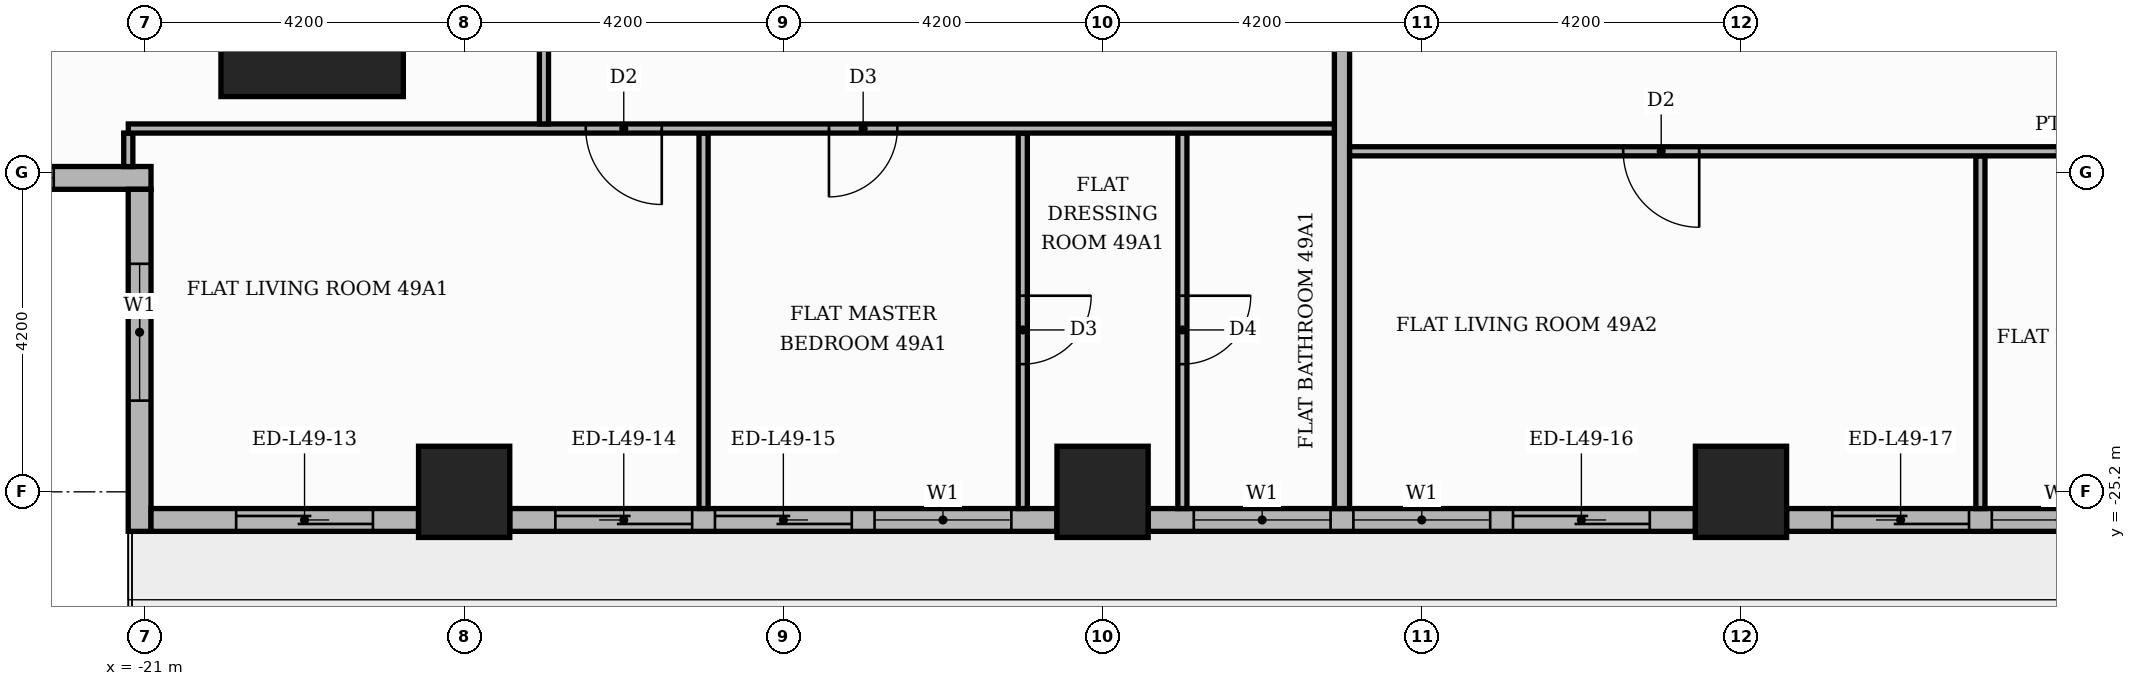
"""IFC4 building model, lengths in metres.
Left out: names, types, materials, properties, quantities, classifications, styles, units other than length and angle.
Written with IfcOpenShell. Run it as: python <this file> out.ifc"""

import sys

from ifc_helpers import new_model, si_unit, direction, frame, frame_2d, origin, origin_2d, place, context, subcontext, project, spatial, rectangle, extrude, element, fill, save


model = new_model("IFC4")
c1 = context("Model", 3, precision=1e-05, world=origin(), true_north=direction((0.0, 1.0)))
c2 = subcontext(c1, "Body", "Model", "MODEL_VIEW")
j1 = project(units=[si_unit("LENGTHUNIT", "METRE"), si_unit("PLANEANGLEUNIT", "RADIAN")], contexts=[c1])
p1 = place(None, origin())
s1 = spatial("IfcSite", under=j1, at=p1, CompositionType="ELEMENT")
p2 = place(p1, origin())
s2 = spatial("IfcBuilding", under=s1, at=p2, CompositionType="ELEMENT")
p3 = place(p2, frame((0.0, 0.0, 207.9)))
s3 = spatial("IfcBuildingStorey", under=s2, at=p3, CompositionType="ELEMENT", Elevation=207.9)
p4 = place(p3, frame((-18.8, -18.8, 0.0), z_axis=(0.0, 0.0, 1.0), x_axis=(1.0, 0.0, 0.0)))
e1 = element("IfcColumn", 1, at=p4, inside=s3, PredefinedType="COLUMN", context=c2, shape_type="SweptSolid", body=[
    extrude(rectangle(XDim=2.4, YDim=2.4, at=origin_2d()), origin(), (0.0, 0.0, 1.0), 3.9),
])
for number, where, z_axis, x_axis in (
    (2, (0.0, -25.2, 0.0), (0.0, 0.0, 1.0), (1.0, 0.0, 0.0)),
    (3, (-8.4, -25.2, 0.0), (0.0, 0.0, 1.0), (1.0, 0.0, 0.0)),
    (4, (-16.8, -25.2, 0.0), (0.0, 0.0, 1.0), (1.0, 0.0, 0.0)),
):
    element("IfcColumn", number, at=place(p3, frame(where, z_axis=z_axis, x_axis=x_axis)), inside=s3, PredefinedType="COLUMN", context=c2, shape_type="SweptSolid", body=[
        extrude(rectangle(XDim=1.2, YDim=1.2, at=origin_2d()), origin(), (0.0, 0.0, 1.0), 3.9),
    ])
p5 = place(p3, frame((-25.42, -21.07, 0.0), z_axis=(0.0, 0.0, 1.0), x_axis=(1.0, 0.0, 0.0)))
e5 = element("IfcWall", 5, at=p5, inside=s3, PredefinedType="STANDARD", context=c2, shape_type="SweptSolid", body=[
    extrude(rectangle(XDim=4.5, YDim=0.3, at=frame_2d((2.25, 0.0))), origin(), (0.0, 0.0, 1.0), 3.48),
])
p6 = place(p5, frame((1.42, 0.0, 0.9)))
e6 = element("IfcOpeningElement", 6, at=p6, cuts=e5, PredefinedType="OPENING", context=c2, shape_type="SweptSolid", body=[
    extrude(rectangle(XDim=1.8, YDim=2.1, at=frame_2d((0.9, 1.05))), frame((0.0, 0.16, 0.0), z_axis=(0.0, -1.0, 0.0), x_axis=(1.0, 0.0, 0.0)), (0.0, 0.0, 1.0), 0.32),
])
p7 = place(p3, frame((-21.07, -21.22, 0.0), z_axis=(0.0, 0.0, 1.0), x_axis=(0.0, -1.0, 0.0)))
e7 = element("IfcWall", 7, at=p7, inside=s3, PredefinedType="STANDARD", context=c2, shape_type="SweptSolid", body=[
    extrude(rectangle(XDim=4.5, YDim=0.3, at=frame_2d((2.25, 0.0))), origin(), (0.0, 0.0, 1.0), 3.48),
])
p8 = place(p7, frame((0.98, 0.0, 0.9)))
e8 = element("IfcOpeningElement", 8, at=p8, cuts=e7, PredefinedType="OPENING", context=c2, shape_type="SweptSolid", body=[
    extrude(rectangle(XDim=1.8, YDim=2.1, at=frame_2d((0.9, 1.05))), frame((0.0, 0.16, 0.0), z_axis=(0.0, -1.0, 0.0), x_axis=(1.0, 0.0, 0.0)), (0.0, 0.0, 1.0), 0.32),
])
p9 = place(p3, frame((-20.92, -25.57, 0.0), z_axis=(0.0, 0.0, 1.0), x_axis=(1.0, 0.0, 0.0)))
e9 = element("IfcWall", 9, at=p9, inside=s3, PredefinedType="STANDARD", context=c2, shape_type="SweptSolid", body=[
    extrude(rectangle(XDim=3.52, YDim=0.3, at=frame_2d((1.76, 0.0))), origin(), (0.0, 0.0, 1.0), 3.48),
])
p10 = place(p9, frame((1.12, 0.0, 0.0)))
e10 = element("IfcOpeningElement", 10, at=p10, cuts=e9, PredefinedType="OPENING", context=c2, shape_type="SweptSolid", body=[
    extrude(rectangle(XDim=1.8, YDim=2.4, at=frame_2d((0.9, 1.2))), frame((0.0, 0.16, 0.0), z_axis=(0.0, -1.0, 0.0), x_axis=(1.0, 0.0, 0.0)), (0.0, 0.0, 1.0), 0.32),
])
p11 = place(p3, frame((-16.2, -25.57, 0.0), z_axis=(0.0, 0.0, 1.0), x_axis=(1.0, 0.0, 0.0)))
e11 = element("IfcWall", 11, at=p11, inside=s3, PredefinedType="STANDARD", context=c2, shape_type="SweptSolid", body=[
    extrude(rectangle(XDim=7.2, YDim=0.3, at=frame_2d((3.6, 0.0))), origin(), (0.0, 0.0, 1.0), 3.48),
])
p12 = place(p11, frame((0.6, 0.0, 0.0)))
e12 = element("IfcOpeningElement", 12, at=p12, cuts=e11, PredefinedType="OPENING", context=c2, shape_type="SweptSolid", body=[
    extrude(rectangle(XDim=1.8, YDim=2.4, at=frame_2d((0.9, 1.2))), frame((0.0, 0.16, 0.0), z_axis=(0.0, -1.0, 0.0), x_axis=(1.0, 0.0, 0.0)), (0.0, 0.0, 1.0), 0.32),
])
p13 = place(p11, frame((2.7, 0.0, 0.0)))
e13 = element("IfcOpeningElement", 13, at=p13, cuts=e11, PredefinedType="OPENING", context=c2, shape_type="SweptSolid", body=[
    extrude(rectangle(XDim=1.8, YDim=2.4, at=frame_2d((0.9, 1.2))), frame((0.0, 0.16, 0.0), z_axis=(0.0, -1.0, 0.0), x_axis=(1.0, 0.0, 0.0)), (0.0, 0.0, 1.0), 0.32),
])
p14 = place(p11, frame((4.8, 0.0, 0.9)))
e14 = element("IfcOpeningElement", 14, at=p14, cuts=e11, PredefinedType="OPENING", context=c2, shape_type="SweptSolid", body=[
    extrude(rectangle(XDim=1.8, YDim=2.1, at=frame_2d((0.9, 1.05))), frame((0.0, 0.16, 0.0), z_axis=(0.0, -1.0, 0.0), x_axis=(1.0, 0.0, 0.0)), (0.0, 0.0, 1.0), 0.32),
])
p15 = place(p3, frame((-7.8, -25.57, 0.0), z_axis=(0.0, 0.0, 1.0), x_axis=(1.0, 0.0, 0.0)))
e15 = element("IfcWall", 15, at=p15, inside=s3, PredefinedType="STANDARD", context=c2, shape_type="SweptSolid", body=[
    extrude(rectangle(XDim=7.2, YDim=0.3, at=frame_2d((3.6, 0.0))), origin(), (0.0, 0.0, 1.0), 3.48),
])
p16 = place(p15, frame((0.6, 0.0, 0.9)))
e16 = element("IfcOpeningElement", 16, at=p16, cuts=e15, PredefinedType="OPENING", context=c2, shape_type="SweptSolid", body=[
    extrude(rectangle(XDim=1.8, YDim=2.1, at=frame_2d((0.9, 1.05))), frame((0.0, 0.16, 0.0), z_axis=(0.0, -1.0, 0.0), x_axis=(1.0, 0.0, 0.0)), (0.0, 0.0, 1.0), 0.32),
])
p17 = place(p15, frame((2.7, 0.0, 0.9)))
e17 = element("IfcOpeningElement", 17, at=p17, cuts=e15, PredefinedType="OPENING", context=c2, shape_type="SweptSolid", body=[
    extrude(rectangle(XDim=1.8, YDim=2.1, at=frame_2d((0.9, 1.05))), frame((0.0, 0.16, 0.0), z_axis=(0.0, -1.0, 0.0), x_axis=(1.0, 0.0, 0.0)), (0.0, 0.0, 1.0), 0.32),
])
p18 = place(p15, frame((4.8, 0.0, 0.0)))
e18 = element("IfcOpeningElement", 18, at=p18, cuts=e15, PredefinedType="OPENING", context=c2, shape_type="SweptSolid", body=[
    extrude(rectangle(XDim=1.8, YDim=2.4, at=frame_2d((0.9, 1.2))), frame((0.0, 0.16, 0.0), z_axis=(0.0, -1.0, 0.0), x_axis=(1.0, 0.0, 0.0)), (0.0, 0.0, 1.0), 0.32),
])
p19 = place(p3, frame((0.6, -25.57, 0.0), z_axis=(0.0, 0.0, 1.0), x_axis=(1.0, 0.0, 0.0)))
e19 = element("IfcWall", 19, at=p19, inside=s3, PredefinedType="STANDARD", context=c2, shape_type="SweptSolid", body=[
    extrude(rectangle(XDim=7.2, YDim=0.3, at=frame_2d((3.6, 0.0))), origin(), (0.0, 0.0, 1.0), 3.48),
])
p20 = place(p19, frame((0.6, 0.0, 0.0)))
e20 = element("IfcOpeningElement", 20, at=p20, cuts=e19, PredefinedType="OPENING", context=c2, shape_type="SweptSolid", body=[
    extrude(rectangle(XDim=1.8, YDim=2.4, at=frame_2d((0.9, 1.2))), frame((0.0, 0.16, 0.0), z_axis=(0.0, -1.0, 0.0), x_axis=(1.0, 0.0, 0.0)), (0.0, 0.0, 1.0), 0.32),
])
p21 = place(p19, frame((2.7, 0.0, 0.9)))
e21 = element("IfcOpeningElement", 21, at=p21, cuts=e19, PredefinedType="OPENING", context=c2, shape_type="SweptSolid", body=[
    extrude(rectangle(XDim=1.8, YDim=2.1, at=frame_2d((0.9, 1.05))), frame((0.0, 0.16, 0.0), z_axis=(0.0, -1.0, 0.0), x_axis=(1.0, 0.0, 0.0)), (0.0, 0.0, 1.0), 0.32),
])
p22 = place(p19, frame((4.8, 0.0, 0.0)))
e22 = element("IfcOpeningElement", 22, at=p22, cuts=e19, PredefinedType="OPENING", context=c2, shape_type="SweptSolid", body=[
    extrude(rectangle(XDim=1.8, YDim=2.4, at=frame_2d((0.9, 1.2))), frame((0.0, 0.16, 0.0), z_axis=(0.0, -1.0, 0.0), x_axis=(1.0, 0.0, 0.0)), (0.0, 0.0, 1.0), 0.32),
])
p23 = place(p3, frame((-13.65, -25.42, 0.0), z_axis=(0.0, 0.0, 1.0), x_axis=(0.0, 1.0, 0.0)))
e23 = element("IfcWall", 23, at=p23, inside=s3, PredefinedType="PARTITIONING", context=c2, shape_type="SweptSolid", body=[
    extrude(rectangle(XDim=4.94, YDim=0.12, at=frame_2d((2.47, 0.0))), origin(), (0.0, 0.0, 1.0), 3.48),
])
p24 = place(p3, frame((-9.45, -25.42, 0.0), z_axis=(0.0, 0.0, 1.0), x_axis=(0.0, 1.0, 0.0)))
e24 = element("IfcWall", 24, at=p24, inside=s3, PredefinedType="PARTITIONING", context=c2, shape_type="SweptSolid", body=[
    extrude(rectangle(XDim=4.94, YDim=0.12, at=frame_2d((2.47, 0.0))), origin(), (0.0, 0.0, 1.0), 3.48),
])
p25 = place(p24, frame((1.9, 0.0, 0.0)))
e25 = element("IfcOpeningElement", 25, at=p25, cuts=e24, PredefinedType="OPENING", context=c2, shape_type="SweptSolid", body=[
    extrude(rectangle(XDim=0.9, YDim=2.1, at=frame_2d((0.45, 1.05))), frame((0.0, 0.07, 0.0), z_axis=(0.0, -1.0, 0.0), x_axis=(1.0, 0.0, 0.0)), (0.0, 0.0, 1.0), 0.14),
])
p26 = place(p3, frame((-7.35, -25.42, 0.0), z_axis=(0.0, 0.0, 1.0), x_axis=(0.0, 1.0, 0.0)))
e26 = element("IfcWall", 26, at=p26, inside=s3, PredefinedType="PARTITIONING", context=c2, shape_type="SweptSolid", body=[
    extrude(rectangle(XDim=4.94, YDim=0.12, at=frame_2d((2.47, 0.0))), origin(), (0.0, 0.0, 1.0), 3.48),
])
p27 = place(p26, frame((1.9, 0.0, 0.0)))
e27 = element("IfcOpeningElement", 27, at=p27, cuts=e26, PredefinedType="OPENING", context=c2, shape_type="SweptSolid", body=[
    extrude(rectangle(XDim=0.9, YDim=2.1, at=frame_2d((0.45, 1.05))), frame((0.0, 0.07, 0.0), z_axis=(0.0, -1.0, 0.0), x_axis=(1.0, 0.0, 0.0)), (0.0, 0.0, 1.0), 0.14),
])
p28 = place(p3, frame((-5.25, -25.42, 0.0), z_axis=(0.0, 0.0, 1.0), x_axis=(0.0, 1.0, 0.0)))
e28 = element("IfcWall", 28, at=p28, inside=s3, PredefinedType="PARTITIONING", context=c2, shape_type="SweptSolid", body=[
    extrude(rectangle(XDim=11.67, YDim=0.2, at=frame_2d((5.835, 0.0))), origin(), (0.0, 0.0, 1.0), 3.48),
])
p29 = place(p3, frame((3.15, -25.42, 0.0), z_axis=(0.0, 0.0, 1.0), x_axis=(0.0, 1.0, 0.0)))
e29 = element("IfcWall", 29, at=p29, inside=s3, PredefinedType="PARTITIONING", context=c2, shape_type="SweptSolid", body=[
    extrude(rectangle(XDim=4.64, YDim=0.12, at=frame_2d((2.32, 0.0))), origin(), (0.0, 0.0, 1.0), 3.48),
])
p30 = place(p3, frame((-21.219, -20.921, 0.0), z_axis=(0.0, 0.0, 1.0), x_axis=(0.0, 1.0, 0.0)))
e30 = element("IfcWall", 30, at=p30, inside=s3, PredefinedType="PARTITIONING", context=c2, shape_type="SweptSolid", body=[
    extrude(rectangle(XDim=0.441, YDim=0.12, at=frame_2d((0.22, 0.0))), origin(), (0.0, 0.0, 1.0), 3.48),
])
p31 = place(p3, frame((-5.15, -20.72, 0.0), z_axis=(0.0, 0.0, 1.0), x_axis=(1.0, 0.0, 0.0)))
e31 = element("IfcWall", 31, at=p31, inside=s3, PredefinedType="PARTITIONING", context=c2, shape_type="SweptSolid", body=[
    extrude(rectangle(XDim=18.7, YDim=0.12, at=frame_2d((9.35, 0.0))), origin(), (0.0, 0.0, 1.0), 3.48),
])
p32 = place(p31, frame((3.6, 0.0, 0.0)))
e32 = element("IfcOpeningElement", 32, at=p32, cuts=e31, PredefinedType="OPENING", context=c2, shape_type="SweptSolid", body=[
    extrude(rectangle(XDim=1.0, YDim=2.1, at=frame_2d((0.5, 1.05))), frame((0.0, 0.07, 0.0), z_axis=(0.0, -1.0, 0.0), x_axis=(1.0, 0.0, 0.0)), (0.0, 0.0, 1.0), 0.14),
])
p33 = place(p31, frame((11.0, 0.0, 0.0)))
e33 = element("IfcOpeningElement", 33, at=p33, cuts=e31, PredefinedType="OPENING", context=c2, shape_type="SweptSolid", body=[
    extrude(rectangle(XDim=0.9, YDim=2.1, at=frame_2d((0.45, 1.05))), frame((0.0, 0.07, 0.0), z_axis=(0.0, -1.0, 0.0), x_axis=(1.0, 0.0, 0.0)), (0.0, 0.0, 1.0), 0.14),
])
p34 = place(p3, frame((-21.219, -20.42, 0.0), z_axis=(0.0, 0.0, 1.0), x_axis=(1.0, 0.0, 0.0)))
e34 = element("IfcWall", 34, at=p34, inside=s3, PredefinedType="PARTITIONING", context=c2, shape_type="SweptSolid", body=[
    extrude(rectangle(XDim=15.869, YDim=0.12, at=frame_2d((7.935, 0.0))), origin(), (0.0, 0.0, 1.0), 3.48),
])
p35 = place(p34, frame((6.019, 0.0, 0.0)))
e35 = element("IfcOpeningElement", 35, at=p35, cuts=e34, PredefinedType="OPENING", context=c2, shape_type="SweptSolid", body=[
    extrude(rectangle(XDim=1.0, YDim=2.1, at=frame_2d((0.5, 1.05))), frame((0.0, 0.07, 0.0), z_axis=(0.0, -1.0, 0.0), x_axis=(1.0, 0.0, 0.0)), (0.0, 0.0, 1.0), 0.14),
])
p36 = place(p34, frame((9.219, 0.0, 0.0)))
e36 = element("IfcOpeningElement", 36, at=p36, cuts=e34, PredefinedType="OPENING", context=c2, shape_type="SweptSolid", body=[
    extrude(rectangle(XDim=0.9, YDim=2.1, at=frame_2d((0.45, 1.05))), frame((0.0, 0.07, 0.0), z_axis=(0.0, -1.0, 0.0), x_axis=(1.0, 0.0, 0.0)), (0.0, 0.0, 1.0), 0.14),
])
p37 = place(p3, frame((-15.75, -20.36, 0.0), z_axis=(0.0, 0.0, 1.0), x_axis=(0.0, 1.0, 0.0)))
e37 = element("IfcWall", 37, at=p37, inside=s3, PredefinedType="PARTITIONING", context=c2, shape_type="SweptSolid", body=[
    extrude(rectangle(XDim=6.61, YDim=0.12, at=frame_2d((3.305, 0.0))), origin(), (0.0, 0.0, 1.0), 3.48),
])
p38 = place(p37, frame((2.825, 0.0, 0.0)))
e38 = element("IfcOpeningElement", 38, at=p38, cuts=e37, PredefinedType="OPENING", context=c2, shape_type="SweptSolid", body=[
    extrude(rectangle(XDim=1.0, YDim=2.1, at=frame_2d((0.5, 1.05))), frame((0.0, 0.07, 0.0), z_axis=(0.0, -1.0, 0.0), x_axis=(1.0, 0.0, 0.0)), (0.0, 0.0, 1.0), 0.14),
])
p39 = place(p6, origin())
e39 = element("IfcWindow", 39, at=p39, inside=s3, PartitioningType="SINGLE_PANEL", PredefinedType="WINDOW", context=c2, shape_type="SweptSolid", body=[
    extrude(rectangle(XDim=1.8, YDim=2.1, at=frame_2d((0.9, 1.05))), frame((0.0, 0.03, 0.0), z_axis=(0.0, -1.0, 0.0), x_axis=(1.0, 0.0, 0.0)), (0.0, 0.0, 1.0), 0.06),
])
fill(e6, e39)
p40 = place(p8, origin())
e40 = element("IfcWindow", 40, at=p40, inside=s3, PartitioningType="SINGLE_PANEL", PredefinedType="WINDOW", context=c2, shape_type="SweptSolid", body=[
    extrude(rectangle(XDim=1.8, YDim=2.1, at=frame_2d((0.9, 1.05))), frame((0.0, 0.03, 0.0), z_axis=(0.0, -1.0, 0.0), x_axis=(1.0, 0.0, 0.0)), (0.0, 0.0, 1.0), 0.06),
])
fill(e8, e40)
p41 = place(p10, origin())
e41 = element("IfcDoor", 41, at=p41, inside=s3, OperationType="SLIDING_TO_RIGHT", PredefinedType="DOOR", context=c2, shape_type="SweptSolid", body=[
    extrude(rectangle(XDim=1.8, YDim=2.4, at=frame_2d((0.9, 1.2))), frame((0.0, 0.025, 0.0), z_axis=(0.0, -1.0, 0.0), x_axis=(1.0, 0.0, 0.0)), (0.0, 0.0, 1.0), 0.05),
])
fill(e10, e41)
p42 = place(p12, origin())
e42 = element("IfcDoor", 42, at=p42, inside=s3, OperationType="SLIDING_TO_LEFT", PredefinedType="DOOR", context=c2, shape_type="SweptSolid", body=[
    extrude(rectangle(XDim=1.8, YDim=2.4, at=frame_2d((0.9, 1.2))), frame((0.0, 0.025, 0.0), z_axis=(0.0, -1.0, 0.0), x_axis=(1.0, 0.0, 0.0)), (0.0, 0.0, 1.0), 0.05),
])
fill(e12, e42)
p43 = place(p13, origin())
e43 = element("IfcDoor", 43, at=p43, inside=s3, OperationType="SLIDING_TO_RIGHT", PredefinedType="DOOR", context=c2, shape_type="SweptSolid", body=[
    extrude(rectangle(XDim=1.8, YDim=2.4, at=frame_2d((0.9, 1.2))), frame((0.0, 0.025, 0.0), z_axis=(0.0, -1.0, 0.0), x_axis=(1.0, 0.0, 0.0)), (0.0, 0.0, 1.0), 0.05),
])
fill(e13, e43)
p44 = place(p14, origin())
e44 = element("IfcWindow", 44, at=p44, inside=s3, PartitioningType="SINGLE_PANEL", PredefinedType="WINDOW", context=c2, shape_type="SweptSolid", body=[
    extrude(rectangle(XDim=1.8, YDim=2.1, at=frame_2d((0.9, 1.05))), frame((0.0, 0.03, 0.0), z_axis=(0.0, -1.0, 0.0), x_axis=(1.0, 0.0, 0.0)), (0.0, 0.0, 1.0), 0.06),
])
fill(e14, e44)
p45 = place(p16, origin())
e45 = element("IfcWindow", 45, at=p45, inside=s3, PartitioningType="SINGLE_PANEL", PredefinedType="WINDOW", context=c2, shape_type="SweptSolid", body=[
    extrude(rectangle(XDim=1.8, YDim=2.1, at=frame_2d((0.9, 1.05))), frame((0.0, 0.03, 0.0), z_axis=(0.0, -1.0, 0.0), x_axis=(1.0, 0.0, 0.0)), (0.0, 0.0, 1.0), 0.06),
])
fill(e16, e45)
p46 = place(p17, origin())
e46 = element("IfcWindow", 46, at=p46, inside=s3, PartitioningType="SINGLE_PANEL", PredefinedType="WINDOW", context=c2, shape_type="SweptSolid", body=[
    extrude(rectangle(XDim=1.8, YDim=2.1, at=frame_2d((0.9, 1.05))), frame((0.0, 0.03, 0.0), z_axis=(0.0, -1.0, 0.0), x_axis=(1.0, 0.0, 0.0)), (0.0, 0.0, 1.0), 0.06),
])
fill(e17, e46)
p47 = place(p18, origin())
e47 = element("IfcDoor", 47, at=p47, inside=s3, OperationType="SLIDING_TO_RIGHT", PredefinedType="DOOR", context=c2, shape_type="SweptSolid", body=[
    extrude(rectangle(XDim=1.8, YDim=2.4, at=frame_2d((0.9, 1.2))), frame((0.0, 0.025, 0.0), z_axis=(0.0, -1.0, 0.0), x_axis=(1.0, 0.0, 0.0)), (0.0, 0.0, 1.0), 0.05),
])
fill(e18, e47)
p48 = place(p20, origin())
e48 = element("IfcDoor", 48, at=p48, inside=s3, OperationType="SLIDING_TO_LEFT", PredefinedType="DOOR", context=c2, shape_type="SweptSolid", body=[
    extrude(rectangle(XDim=1.8, YDim=2.4, at=frame_2d((0.9, 1.2))), frame((0.0, 0.025, 0.0), z_axis=(0.0, -1.0, 0.0), x_axis=(1.0, 0.0, 0.0)), (0.0, 0.0, 1.0), 0.05),
])
fill(e20, e48)
p49 = place(p21, origin())
e49 = element("IfcWindow", 49, at=p49, inside=s3, PartitioningType="SINGLE_PANEL", PredefinedType="WINDOW", context=c2, shape_type="SweptSolid", body=[
    extrude(rectangle(XDim=1.8, YDim=2.1, at=frame_2d((0.9, 1.05))), frame((0.0, 0.03, 0.0), z_axis=(0.0, -1.0, 0.0), x_axis=(1.0, 0.0, 0.0)), (0.0, 0.0, 1.0), 0.06),
])
fill(e21, e49)
p50 = place(p35, frame((1.0, 0.0, 0.0), z_axis=(0.0, 0.0, 1.0), x_axis=(-1.0, 0.0, 0.0)))
e50 = element("IfcDoor", 50, at=p50, inside=s3, OperationType="SINGLE_SWING_RIGHT", PredefinedType="DOOR", context=c2, shape_type="SweptSolid", body=[
    extrude(rectangle(XDim=1.0, YDim=2.1, at=frame_2d((0.5, 1.05))), frame((0.0, 0.025, 0.0), z_axis=(0.0, -1.0, 0.0), x_axis=(1.0, 0.0, 0.0)), (0.0, 0.0, 1.0), 0.05),
])
fill(e35, e50)
p51 = place(p36, frame((0.9, 0.0, 0.0), z_axis=(0.0, 0.0, 1.0), x_axis=(-1.0, 0.0, 0.0)))
e51 = element("IfcDoor", 51, at=p51, inside=s3, OperationType="SINGLE_SWING_LEFT", PredefinedType="DOOR", context=c2, shape_type="SweptSolid", body=[
    extrude(rectangle(XDim=0.9, YDim=2.1, at=frame_2d((0.45, 1.05))), frame((0.0, 0.025, 0.0), z_axis=(0.0, -1.0, 0.0), x_axis=(1.0, 0.0, 0.0)), (0.0, 0.0, 1.0), 0.05),
])
fill(e36, e51)
p52 = place(p25, frame((0.9, 0.0, 0.0), z_axis=(0.0, 0.0, 1.0), x_axis=(-1.0, 0.0, 0.0)))
e52 = element("IfcDoor", 52, at=p52, inside=s3, OperationType="SINGLE_SWING_RIGHT", PredefinedType="DOOR", context=c2, shape_type="SweptSolid", body=[
    extrude(rectangle(XDim=0.9, YDim=2.1, at=frame_2d((0.45, 1.05))), frame((0.0, 0.025, 0.0), z_axis=(0.0, -1.0, 0.0), x_axis=(1.0, 0.0, 0.0)), (0.0, 0.0, 1.0), 0.05),
])
fill(e25, e52)
p53 = place(p27, frame((0.9, 0.0, 0.0), z_axis=(0.0, 0.0, 1.0), x_axis=(-1.0, 0.0, 0.0)))
e53 = element("IfcDoor", 53, at=p53, inside=s3, OperationType="SINGLE_SWING_RIGHT", PredefinedType="DOOR", context=c2, shape_type="SweptSolid", body=[
    extrude(rectangle(XDim=0.9, YDim=2.1, at=frame_2d((0.45, 1.05))), frame((0.0, 0.025, 0.0), z_axis=(0.0, -1.0, 0.0), x_axis=(1.0, 0.0, 0.0)), (0.0, 0.0, 1.0), 0.05),
])
fill(e27, e53)
p54 = place(p32, frame((1.0, 0.0, 0.0), z_axis=(0.0, 0.0, 1.0), x_axis=(-1.0, 0.0, 0.0)))
e54 = element("IfcDoor", 54, at=p54, inside=s3, OperationType="SINGLE_SWING_RIGHT", PredefinedType="DOOR", context=c2, shape_type="SweptSolid", body=[
    extrude(rectangle(XDim=1.0, YDim=2.1, at=frame_2d((0.5, 1.05))), frame((0.0, 0.025, 0.0), z_axis=(0.0, -1.0, 0.0), x_axis=(1.0, 0.0, 0.0)), (0.0, 0.0, 1.0), 0.05),
])
fill(e32, e54)
save(model, sys.argv[1])
